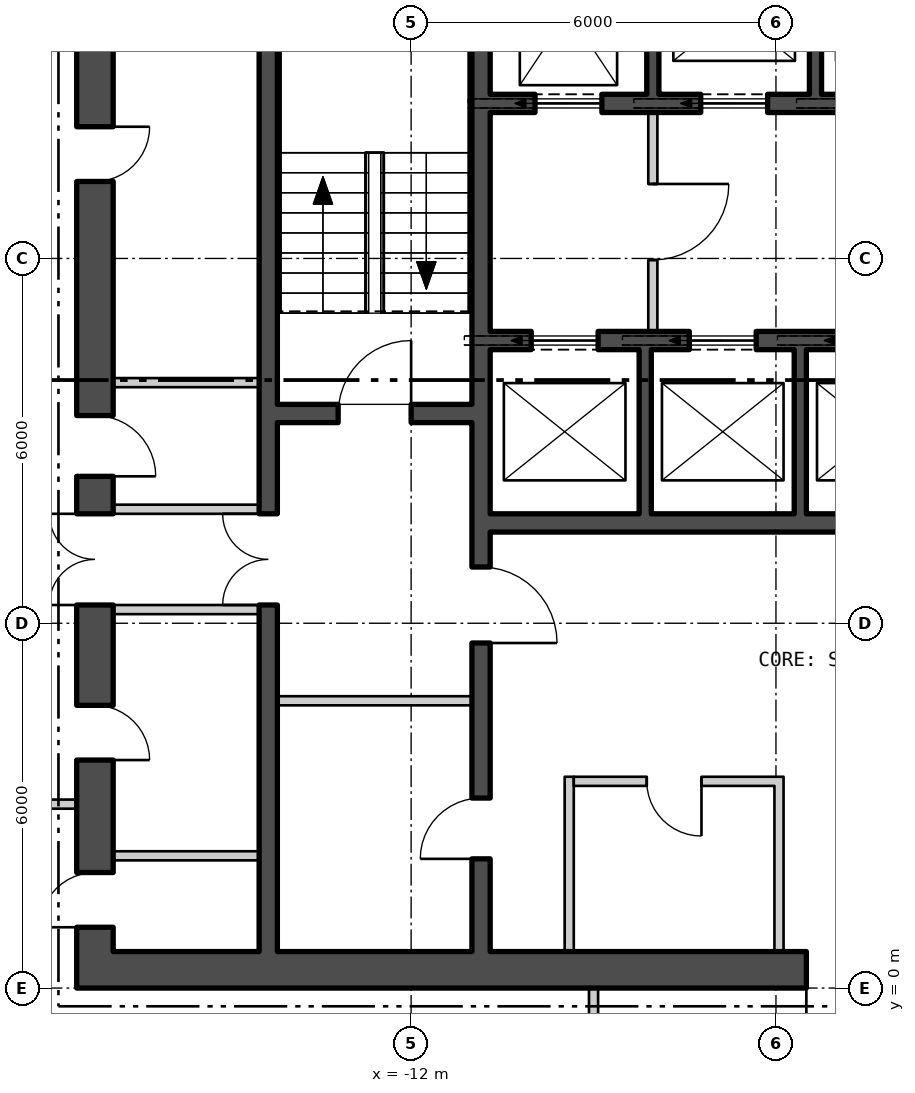
"""IFC4 building model, lengths in metres.
Left out: names, types, materials, properties, quantities, classifications, styles, units other than length and angle.
Written with IfcOpenShell. Run it as: python <this file> out.ifc"""

import sys

from ifc_helpers import new_model, si_unit, direction, frame, frame_2d, origin, place, context, subcontext, project, spatial, rectangle, extrude, element, fill, save


model = new_model("IFC4")
c1 = context("Model", 3, precision=1e-05, world=origin(), true_north=direction((0.0, 1.0)))
c2 = subcontext(c1, "Body", "Model", "MODEL_VIEW")
j1 = project(units=[si_unit("LENGTHUNIT", "METRE"), si_unit("PLANEANGLEUNIT", "RADIAN")], contexts=[c1])
p1 = place(None, origin())
s1 = spatial("IfcSite", under=j1, at=p1, CompositionType="ELEMENT")
p2 = place(p1, origin())
s2 = spatial("IfcBuilding", under=s1, at=p2, CompositionType="ELEMENT")
p3 = place(p2, frame((0.0, 0.0, 23.7)))
s3 = spatial("IfcBuildingStorey", under=s2, at=p3, CompositionType="ELEMENT", Elevation=23.7)
p4 = place(p3, frame((-17.5, 0.3, 0.0), z_axis=(0.0, 0.0, 1.0), x_axis=(1.0, 0.0, 0.0)))
e1 = element("IfcWall", 1, at=p4, inside=s3, PredefinedType="SHEAR", context=c2, shape_type="SweptSolid", body=[
    extrude(rectangle(XDim=35.0, YDim=0.6, at=frame_2d((17.5, 0.0))), origin(), (0.0, 0.0, 1.0), 4.85),
])
p5 = place(p4, frame((12.0, 0.0, 0.0)))
e2 = element("IfcOpeningElement", 2, at=p5, cuts=e1, PredefinedType="OPENING", context=c2, shape_type="SweptSolid", body=[
    extrude(rectangle(XDim=1.8, YDim=2.4, at=frame_2d((0.9, 1.2))), frame((0.0, 0.31, 0.0), z_axis=(0.0, -1.0, 0.0), x_axis=(1.0, 0.0, 0.0)), (0.0, 0.0, 1.0), 0.62),
])
p6 = place(p4, frame((22.0, 0.0, 0.0)))
e3 = element("IfcOpeningElement", 3, at=p6, cuts=e1, PredefinedType="OPENING", context=c2, shape_type="SweptSolid", body=[
    extrude(rectangle(XDim=1.8, YDim=2.4, at=frame_2d((0.9, 1.2))), frame((0.0, 0.31, 0.0), z_axis=(0.0, -1.0, 0.0), x_axis=(1.0, 0.0, 0.0)), (0.0, 0.0, 1.0), 0.62),
])
p7 = place(p3, frame((-17.2, 0.6, 0.0), z_axis=(0.0, 0.0, 1.0), x_axis=(0.0, 1.0, 0.0)))
e4 = element("IfcWall", 4, at=p7, inside=s3, PredefinedType="SHEAR", context=c2, shape_type="SweptSolid", body=[
    extrude(rectangle(XDim=16.8, YDim=0.6, at=frame_2d((8.4, 0.0))), origin(), (0.0, 0.0, 1.0), 4.85),
])
p8 = place(p7, frame((5.7, 0.0, 0.0)))
e5 = element("IfcOpeningElement", 5, at=p8, cuts=e4, PredefinedType="OPENING", context=c2, shape_type="SweptSolid", body=[
    extrude(rectangle(XDim=1.5, YDim=2.1, at=frame_2d((0.75, 1.05))), frame((0.0, 0.31, 0.0), z_axis=(0.0, -1.0, 0.0), x_axis=(1.0, 0.0, 0.0)), (0.0, 0.0, 1.0), 0.62),
])
p9 = place(p7, frame((0.4, 0.0, 0.0)))
e6 = element("IfcOpeningElement", 6, at=p9, cuts=e4, PredefinedType="OPENING", context=c2, shape_type="SweptSolid", body=[
    extrude(rectangle(XDim=0.9, YDim=2.1, at=frame_2d((0.45, 1.05))), frame((0.0, 0.31, 0.0), z_axis=(0.0, -1.0, 0.0), x_axis=(1.0, 0.0, 0.0)), (0.0, 0.0, 1.0), 0.62),
])
p10 = place(p7, frame((3.15, 0.0, 0.0)))
e7 = element("IfcOpeningElement", 7, at=p10, cuts=e4, PredefinedType="OPENING", context=c2, shape_type="SweptSolid", body=[
    extrude(rectangle(XDim=0.9, YDim=2.1, at=frame_2d((0.45, 1.05))), frame((0.0, 0.31, 0.0), z_axis=(0.0, -1.0, 0.0), x_axis=(1.0, 0.0, 0.0)), (0.0, 0.0, 1.0), 0.62),
])
p11 = place(p7, frame((7.816, 0.0, 0.0)))
e8 = element("IfcOpeningElement", 8, at=p11, cuts=e4, PredefinedType="OPENING", context=c2, shape_type="SweptSolid", body=[
    extrude(rectangle(XDim=1.0, YDim=2.1, at=frame_2d((0.5, 1.05))), frame((0.0, 0.31, 0.0), z_axis=(0.0, -1.0, 0.0), x_axis=(1.0, 0.0, 0.0)), (0.0, 0.0, 1.0), 0.62),
])
p12 = place(p7, frame((12.666, 0.0, 0.0)))
e9 = element("IfcOpeningElement", 9, at=p12, cuts=e4, PredefinedType="OPENING", context=c2, shape_type="SweptSolid", body=[
    extrude(rectangle(XDim=0.9, YDim=2.1, at=frame_2d((0.45, 1.05))), frame((0.0, 0.31, 0.0), z_axis=(0.0, -1.0, 0.0), x_axis=(1.0, 0.0, 0.0)), (0.0, 0.0, 1.0), 0.62),
])
p13 = place(p3, frame((-10.85, 0.6, 0.0), z_axis=(0.0, 0.0, 1.0), x_axis=(0.0, 1.0, 0.0)))
e10 = element("IfcWall", 10, at=p13, inside=s3, PredefinedType="SHEAR", context=c2, shape_type="SweptSolid", body=[
    extrude(rectangle(XDim=16.8, YDim=0.3, at=frame_2d((8.4, 0.0))), origin(), (0.0, 0.0, 1.0), 4.85),
])
p14 = place(p13, frame((5.075, 0.0, 0.0)))
e11 = element("IfcOpeningElement", 11, at=p14, cuts=e10, PredefinedType="OPENING", context=c2, shape_type="SweptSolid", body=[
    extrude(rectangle(XDim=1.25, YDim=2.1, at=frame_2d((0.625, 1.05))), frame((0.0, 0.16, 0.0), z_axis=(0.0, -1.0, 0.0), x_axis=(1.0, 0.0, 0.0)), (0.0, 0.0, 1.0), 0.32),
])
p15 = place(p13, frame((1.525, 0.0, 0.0)))
e12 = element("IfcOpeningElement", 12, at=p15, cuts=e10, PredefinedType="OPENING", context=c2, shape_type="SweptSolid", body=[
    extrude(rectangle(XDim=1.0, YDim=2.1, at=frame_2d((0.5, 1.05))), frame((0.0, 0.16, 0.0), z_axis=(0.0, -1.0, 0.0), x_axis=(1.0, 0.0, 0.0)), (0.0, 0.0, 1.0), 0.32),
])
p16 = place(p3, frame((-14.35, 0.6, 0.0), z_axis=(0.0, 0.0, 1.0), x_axis=(0.0, 1.0, 0.0)))
e13 = element("IfcWall", 13, at=p16, inside=s3, PredefinedType="SHEAR", context=c2, shape_type="SweptSolid", body=[
    extrude(rectangle(XDim=16.8, YDim=0.3, at=frame_2d((8.4, 0.0))), origin(), (0.0, 0.0, 1.0), 4.85),
])
p17 = place(p16, frame((5.7, 0.0, 0.0)))
e14 = element("IfcOpeningElement", 14, at=p17, cuts=e13, PredefinedType="OPENING", context=c2, shape_type="SweptSolid", body=[
    extrude(rectangle(XDim=1.5, YDim=2.1, at=frame_2d((0.75, 1.05))), frame((0.0, 0.16, 0.0), z_axis=(0.0, -1.0, 0.0), x_axis=(1.0, 0.0, 0.0)), (0.0, 0.0, 1.0), 0.32),
])
p18 = place(p3, frame((-14.2, 9.45, 0.0), z_axis=(0.0, 0.0, 1.0), x_axis=(1.0, 0.0, 0.0)))
e15 = element("IfcWall", 15, at=p18, inside=s3, PredefinedType="SHEAR", context=c2, shape_type="SweptSolid", body=[
    extrude(rectangle(XDim=3.2, YDim=0.3, at=frame_2d((1.6, 0.0))), origin(), (0.0, 0.0, 1.0), 4.85),
])
p19 = place(p18, frame((1.0, 0.0, 0.0)))
e16 = element("IfcOpeningElement", 16, at=p19, cuts=e15, PredefinedType="OPENING", context=c2, shape_type="SweptSolid", body=[
    extrude(rectangle(XDim=1.2, YDim=2.1, at=frame_2d((0.6, 1.05))), frame((0.0, 0.16, 0.0), z_axis=(0.0, -1.0, 0.0), x_axis=(1.0, 0.0, 0.0)), (0.0, 0.0, 1.0), 0.32),
])
p20 = place(p3, frame((-10.7, 14.55, 0.0), z_axis=(0.0, 0.0, 1.0), x_axis=(1.0, 0.0, 0.0)))
e17 = element("IfcWall", 17, at=p20, inside=s3, PredefinedType="SHEAR", context=c2, shape_type="SweptSolid", body=[
    extrude(rectangle(XDim=21.4, YDim=0.3, at=frame_2d((10.7, 0.0))), origin(), (0.0, 0.0, 1.0), 4.85),
])
p21 = place(p20, frame((0.738, 0.0, 0.0)))
e18 = element("IfcOpeningElement", 18, at=p21, cuts=e17, PredefinedType="OPENING", context=c2, shape_type="SweptSolid", body=[
    extrude(rectangle(XDim=1.1, YDim=2.1, at=frame_2d((0.55, 1.05))), frame((0.0, 0.16, 0.0), z_axis=(0.0, -1.0, 0.0), x_axis=(1.0, 0.0, 0.0)), (0.0, 0.0, 1.0), 0.32),
])
p22 = place(p20, frame((3.462, 0.0, 0.0)))
e19 = element("IfcOpeningElement", 19, at=p22, cuts=e17, PredefinedType="OPENING", context=c2, shape_type="SweptSolid", body=[
    extrude(rectangle(XDim=1.1, YDim=2.1, at=frame_2d((0.55, 1.05))), frame((0.0, 0.16, 0.0), z_axis=(0.0, -1.0, 0.0), x_axis=(1.0, 0.0, 0.0)), (0.0, 0.0, 1.0), 0.32),
])
p23 = place(p20, frame((6.138, 0.0, 0.0)))
e20 = element("IfcOpeningElement", 20, at=p23, cuts=e17, PredefinedType="OPENING", context=c2, shape_type="SweptSolid", body=[
    extrude(rectangle(XDim=1.1, YDim=2.1, at=frame_2d((0.55, 1.05))), frame((0.0, 0.16, 0.0), z_axis=(0.0, -1.0, 0.0), x_axis=(1.0, 0.0, 0.0)), (0.0, 0.0, 1.0), 0.32),
])
p24 = place(p20, frame((8.812, 0.0, 0.0)))
e21 = element("IfcOpeningElement", 21, at=p24, cuts=e17, PredefinedType="OPENING", context=c2, shape_type="SweptSolid", body=[
    extrude(rectangle(XDim=1.1, YDim=2.1, at=frame_2d((0.55, 1.05))), frame((0.0, 0.16, 0.0), z_axis=(0.0, -1.0, 0.0), x_axis=(1.0, 0.0, 0.0)), (0.0, 0.0, 1.0), 0.32),
])
p25 = place(p20, frame((14.162, 0.0, 0.0)))
e22 = element("IfcOpeningElement", 22, at=p25, cuts=e17, PredefinedType="OPENING", context=c2, shape_type="SweptSolid", body=[
    extrude(rectangle(XDim=1.1, YDim=2.1, at=frame_2d((0.55, 1.05))), frame((0.0, 0.16, 0.0), z_axis=(0.0, -1.0, 0.0), x_axis=(1.0, 0.0, 0.0)), (0.0, 0.0, 1.0), 0.32),
])
p26 = place(p20, frame((16.837, 0.0, 0.0)))
e23 = element("IfcOpeningElement", 23, at=p26, cuts=e17, PredefinedType="OPENING", context=c2, shape_type="SweptSolid", body=[
    extrude(rectangle(XDim=1.1, YDim=2.1, at=frame_2d((0.55, 1.05))), frame((0.0, 0.16, 0.0), z_axis=(0.0, -1.0, 0.0), x_axis=(1.0, 0.0, 0.0)), (0.0, 0.0, 1.0), 0.32),
])
p27 = place(p20, frame((19.562, 0.0, 0.0)))
e24 = element("IfcOpeningElement", 24, at=p27, cuts=e17, PredefinedType="OPENING", context=c2, shape_type="SweptSolid", body=[
    extrude(rectangle(XDim=1.1, YDim=2.1, at=frame_2d((0.55, 1.05))), frame((0.0, 0.16, 0.0), z_axis=(0.0, -1.0, 0.0), x_axis=(1.0, 0.0, 0.0)), (0.0, 0.0, 1.0), 0.32),
])
p28 = place(p3, frame((-10.7, 10.65, 0.0), z_axis=(0.0, 0.0, 1.0), x_axis=(1.0, 0.0, 0.0)))
e25 = element("IfcWall", 25, at=p28, inside=s3, PredefinedType="SHEAR", context=c2, shape_type="SweptSolid", body=[
    extrude(rectangle(XDim=10.3, YDim=0.3, at=frame_2d((5.15, 0.0))), origin(), (0.0, 0.0, 1.0), 4.85),
])
p29 = place(p28, frame((0.675, 0.0, 0.0)))
e26 = element("IfcOpeningElement", 26, at=p29, cuts=e25, PredefinedType="OPENING", context=c2, shape_type="SweptSolid", body=[
    extrude(rectangle(XDim=1.1, YDim=2.1, at=frame_2d((0.55, 1.05))), frame((0.0, 0.16, 0.0), z_axis=(0.0, -1.0, 0.0), x_axis=(1.0, 0.0, 0.0)), (0.0, 0.0, 1.0), 0.32),
])
p30 = place(p28, frame((3.275, 0.0, 0.0)))
e27 = element("IfcOpeningElement", 27, at=p30, cuts=e25, PredefinedType="OPENING", context=c2, shape_type="SweptSolid", body=[
    extrude(rectangle(XDim=1.1, YDim=2.1, at=frame_2d((0.55, 1.05))), frame((0.0, 0.16, 0.0), z_axis=(0.0, -1.0, 0.0), x_axis=(1.0, 0.0, 0.0)), (0.0, 0.0, 1.0), 0.32),
])
p31 = place(p28, frame((5.825, 0.0, 0.0)))
e28 = element("IfcOpeningElement", 28, at=p31, cuts=e25, PredefinedType="OPENING", context=c2, shape_type="SweptSolid", body=[
    extrude(rectangle(XDim=1.1, YDim=2.1, at=frame_2d((0.55, 1.05))), frame((0.0, 0.16, 0.0), z_axis=(0.0, -1.0, 0.0), x_axis=(1.0, 0.0, 0.0)), (0.0, 0.0, 1.0), 0.32),
])
p32 = place(p28, frame((8.375, 0.0, 0.0)))
e29 = element("IfcOpeningElement", 29, at=p32, cuts=e25, PredefinedType="OPENING", context=c2, shape_type="SweptSolid", body=[
    extrude(rectangle(XDim=1.1, YDim=2.1, at=frame_2d((0.55, 1.05))), frame((0.0, 0.16, 0.0), z_axis=(0.0, -1.0, 0.0), x_axis=(1.0, 0.0, 0.0)), (0.0, 0.0, 1.0), 0.32),
])
p33 = place(p3, frame((-10.7, 7.65, 0.0), z_axis=(0.0, 0.0, 1.0), x_axis=(1.0, 0.0, 0.0)))
e30 = element("IfcWall", 30, at=p33, inside=s3, PredefinedType="SHEAR", context=c2, shape_type="SweptSolid", body=[
    extrude(rectangle(XDim=10.3, YDim=0.3, at=frame_2d((5.15, 0.0))), origin(), (0.0, 0.0, 1.0), 4.85),
])
for number, where, z_axis, x_axis in (
    (31, (-8.025, 14.7, 0.0), (0.0, 0.0, 1.0), (0.0, 1.0, 0.0)),
    (32, (-5.35, 14.7, 0.0), (0.0, 0.0, 1.0), (0.0, 1.0, 0.0)),
    (33, (-8.15, 7.8, 0.0), (0.0, 0.0, 1.0), (0.0, 1.0, 0.0)),
    (34, (-5.6, 7.8, 0.0), (0.0, 0.0, 1.0), (0.0, 1.0, 0.0)),
):
    element("IfcWall", number, at=place(p3, frame(where, z_axis=z_axis, x_axis=x_axis)), inside=s3, PredefinedType="SHEAR", context=c2, shape_type="SweptSolid", body=[
        extrude(rectangle(XDim=2.7, YDim=0.2, at=frame_2d((1.35, 0.0))), origin(), (0.0, 0.0, 1.0), 4.85),
    ])
p34 = place(p3, frame((-8.025, 10.8, 0.0), z_axis=(0.0, 0.0, 1.0), x_axis=(0.0, 1.0, 0.0)))
e35 = element("IfcWall", 35, at=p34, inside=s3, PredefinedType="PARTITIONING", context=c2, shape_type="SweptSolid", body=[
    extrude(rectangle(XDim=3.6, YDim=0.15, at=frame_2d((1.8, 0.0))), origin(), (0.0, 0.0, 1.0), 4.85),
])
p35 = place(p34, frame((1.175, 0.0, 0.0)))
e36 = element("IfcOpeningElement", 36, at=p35, cuts=e35, PredefinedType="OPENING", context=c2, shape_type="SweptSolid", body=[
    extrude(rectangle(XDim=1.25, YDim=2.1, at=frame_2d((0.625, 1.05))), frame((0.0, 0.085, 0.0), z_axis=(0.0, -1.0, 0.0), x_axis=(1.0, 0.0, 0.0)), (0.0, 0.0, 1.0), 0.17),
])
p36 = place(p3, frame((-14.2, 4.725, 0.0), z_axis=(0.0, 0.0, 1.0), x_axis=(1.0, 0.0, 0.0)))
e37 = element("IfcWall", 37, at=p36, inside=s3, PredefinedType="PARTITIONING", context=c2, shape_type="SweptSolid", body=[
    extrude(rectangle(XDim=3.2, YDim=0.15, at=frame_2d((1.6, 0.0))), origin(), (0.0, 0.0, 1.0), 4.85),
])
for number, where, z_axis, x_axis in (
    (38, (-16.9, 6.225, 0.0), (0.0, 0.0, 1.0), (1.0, 0.0, 0.0)),
    (39, (-16.9, 7.875, 0.0), (0.0, 0.0, 1.0), (1.0, 0.0, 0.0)),
    (40, (-16.9, 2.175, 0.0), (0.0, 0.0, 1.0), (1.0, 0.0, 0.0)),
    (41, (-16.9, 9.957, 0.0), (0.0, 0.0, 1.0), (1.0, 0.0, 0.0)),
):
    element("IfcWall", number, at=place(p3, frame(where, z_axis=z_axis, x_axis=x_axis)), inside=s3, PredefinedType="PARTITIONING", context=c2, shape_type="SweptSolid", body=[
        extrude(rectangle(XDim=2.4, YDim=0.15, at=frame_2d((1.2, 0.0))), origin(), (0.0, 0.0, 1.0), 4.85),
    ])
for number, where, z_axis, x_axis in (
    (42, (-9.4, 0.6, 0.0), (0.0, 0.0, 1.0), (0.0, 1.0, 0.0)),
    (43, (-5.95, 0.6, 0.0), (0.0, 0.0, 1.0), (0.0, 1.0, 0.0)),
):
    element("IfcWall", number, at=place(p3, frame(where, z_axis=z_axis, x_axis=x_axis)), inside=s3, PredefinedType="PARTITIONING", context=c2, shape_type="SweptSolid", body=[
        extrude(rectangle(XDim=2.875, YDim=0.15, at=frame_2d((1.438, 0.0))), origin(), (0.0, 0.0, 1.0), 4.85),
    ])
p37 = place(p3, frame((-9.325, 3.4, 0.0), z_axis=(0.0, 0.0, 1.0), x_axis=(1.0, 0.0, 0.0)))
e44 = element("IfcWall", 44, at=p37, inside=s3, PredefinedType="PARTITIONING", context=c2, shape_type="SweptSolid", body=[
    extrude(rectangle(XDim=3.3, YDim=0.15, at=frame_2d((1.65, 0.0))), origin(), (0.0, 0.0, 1.0), 4.85),
])
p38 = place(p37, frame((1.2, 0.0, 0.0)))
e45 = element("IfcOpeningElement", 45, at=p38, cuts=e44, PredefinedType="OPENING", context=c2, shape_type="SweptSolid", body=[
    extrude(rectangle(XDim=0.9, YDim=2.1, at=frame_2d((0.45, 1.05))), frame((0.0, 0.085, 0.0), z_axis=(0.0, -1.0, 0.0), x_axis=(1.0, 0.0, 0.0)), (0.0, 0.0, 1.0), 0.17),
])
p39 = place(p3, frame((-19.825, 3.025, 0.0), z_axis=(0.0, 0.0, 1.0), x_axis=(1.0, 0.0, 0.0)))
e46 = element("IfcWall", 46, at=p39, inside=s3, PredefinedType="PARTITIONING", context=c2, shape_type="SweptSolid", body=[
    extrude(rectangle(XDim=2.325, YDim=0.15, at=frame_2d((1.163, 0.0))), origin(), (0.0, 0.0, 1.0), 4.3),
])
p40 = place(p39, frame((0.662, 0.0, 0.0)))
e47 = element("IfcOpeningElement", 47, at=p40, cuts=e46, PredefinedType="OPENING", context=c2, shape_type="SweptSolid", body=[
    extrude(rectangle(XDim=1.0, YDim=2.1, at=frame_2d((0.5, 1.05))), frame((0.0, 0.085, 0.0), z_axis=(0.0, -1.0, 0.0), x_axis=(1.0, 0.0, 0.0)), (0.0, 0.0, 1.0), 0.17),
])
p41 = place(p3, frame((-9.0, -13.675, 0.0), z_axis=(0.0, 0.0, 1.0), x_axis=(0.0, 1.0, 0.0)))
e48 = element("IfcWall", 48, at=p41, inside=s3, PredefinedType="PARTITIONING", context=c2, shape_type="SweptSolid", body=[
    extrude(rectangle(XDim=13.675, YDim=0.15, at=frame_2d((6.838, 0.0))), origin(), (0.0, 0.0, 1.0), 4.85),
])
p42 = place(p41, frame((11.975, 0.0, 0.0)))
e49 = element("IfcOpeningElement", 49, at=p42, cuts=e48, PredefinedType="OPENING", context=c2, shape_type="SweptSolid", body=[
    extrude(rectangle(XDim=1.0, YDim=2.1, at=frame_2d((0.5, 1.05))), frame((0.0, 0.085, 0.0), z_axis=(0.0, -1.0, 0.0), x_axis=(1.0, 0.0, 0.0)), (0.0, 0.0, 1.0), 0.17),
])
p43 = place(p21, origin())
e50 = element("IfcDoor", 50, at=p43, inside=s3, OperationType="SLIDING_TO_LEFT", PredefinedType="DOOR", context=c2, shape_type="SweptSolid", body=[
    extrude(rectangle(XDim=1.1, YDim=2.1, at=frame_2d((0.55, 1.05))), frame((0.0, 0.025, 0.0), z_axis=(0.0, -1.0, 0.0), x_axis=(1.0, 0.0, 0.0)), (0.0, 0.0, 1.0), 0.05),
])
fill(e18, e50)
p44 = place(p22, origin())
e51 = element("IfcDoor", 51, at=p44, inside=s3, OperationType="SLIDING_TO_LEFT", PredefinedType="DOOR", context=c2, shape_type="SweptSolid", body=[
    extrude(rectangle(XDim=1.1, YDim=2.1, at=frame_2d((0.55, 1.05))), frame((0.0, 0.025, 0.0), z_axis=(0.0, -1.0, 0.0), x_axis=(1.0, 0.0, 0.0)), (0.0, 0.0, 1.0), 0.05),
])
fill(e19, e51)
p45 = place(p29, origin())
e52 = element("IfcDoor", 52, at=p45, inside=s3, OperationType="SLIDING_TO_LEFT", PredefinedType="DOOR", context=c2, shape_type="SweptSolid", body=[
    extrude(rectangle(XDim=1.1, YDim=2.1, at=frame_2d((0.55, 1.05))), frame((0.0, 0.025, 0.0), z_axis=(0.0, -1.0, 0.0), x_axis=(1.0, 0.0, 0.0)), (0.0, 0.0, 1.0), 0.05),
])
fill(e26, e52)
p46 = place(p30, origin())
e53 = element("IfcDoor", 53, at=p46, inside=s3, OperationType="SLIDING_TO_LEFT", PredefinedType="DOOR", context=c2, shape_type="SweptSolid", body=[
    extrude(rectangle(XDim=1.1, YDim=2.1, at=frame_2d((0.55, 1.05))), frame((0.0, 0.025, 0.0), z_axis=(0.0, -1.0, 0.0), x_axis=(1.0, 0.0, 0.0)), (0.0, 0.0, 1.0), 0.05),
])
fill(e27, e53)
p47 = place(p35, origin())
e54 = element("IfcDoor", 54, at=p47, inside=s3, OperationType="SINGLE_SWING_RIGHT", PredefinedType="DOOR", context=c2, shape_type="SweptSolid", body=[
    extrude(rectangle(XDim=1.25, YDim=2.1, at=frame_2d((0.625, 1.05))), frame((0.0, 0.025, 0.0), z_axis=(0.0, -1.0, 0.0), x_axis=(1.0, 0.0, 0.0)), (0.0, 0.0, 1.0), 0.05),
])
fill(e36, e54)
p48 = place(p19, origin())
e55 = element("IfcDoor", 55, at=p48, inside=s3, OperationType="SINGLE_SWING_LEFT", PredefinedType="DOOR", context=c2, shape_type="SweptSolid", body=[
    extrude(rectangle(XDim=1.2, YDim=2.1, at=frame_2d((0.6, 1.05))), frame((0.0, 0.025, 0.0), z_axis=(0.0, -1.0, 0.0), x_axis=(1.0, 0.0, 0.0)), (0.0, 0.0, 1.0), 0.05),
])
fill(e16, e55)
p49 = place(p14, origin())
e56 = element("IfcDoor", 56, at=p49, inside=s3, OperationType="SINGLE_SWING_LEFT", PredefinedType="DOOR", context=c2, shape_type="SweptSolid", body=[
    extrude(rectangle(XDim=1.25, YDim=2.1, at=frame_2d((0.625, 1.05))), frame((0.0, 0.025, 0.0), z_axis=(0.0, -1.0, 0.0), x_axis=(1.0, 0.0, 0.0)), (0.0, 0.0, 1.0), 0.05),
])
fill(e11, e56)
p50 = place(p15, origin())
e57 = element("IfcDoor", 57, at=p50, inside=s3, OperationType="SINGLE_SWING_RIGHT", PredefinedType="DOOR", context=c2, shape_type="SweptSolid", body=[
    extrude(rectangle(XDim=1.0, YDim=2.1, at=frame_2d((0.5, 1.05))), frame((0.0, 0.025, 0.0), z_axis=(0.0, -1.0, 0.0), x_axis=(1.0, 0.0, 0.0)), (0.0, 0.0, 1.0), 0.05),
])
fill(e12, e57)
p51 = place(p17, origin())
e58 = element("IfcDoor", 58, at=p51, inside=s3, OperationType="DOUBLE_DOOR_SINGLE_SWING", PredefinedType="DOOR", context=c2, shape_type="SweptSolid", body=[
    extrude(rectangle(XDim=1.5, YDim=2.1, at=frame_2d((0.75, 1.05))), frame((0.0, 0.025, 0.0), z_axis=(0.0, -1.0, 0.0), x_axis=(1.0, 0.0, 0.0)), (0.0, 0.0, 1.0), 0.05),
])
fill(e14, e58)
p52 = place(p8, origin())
e59 = element("IfcDoor", 59, at=p52, inside=s3, OperationType="DOUBLE_DOOR_SINGLE_SWING", PredefinedType="DOOR", context=c2, shape_type="SweptSolid", body=[
    extrude(rectangle(XDim=1.5, YDim=2.1, at=frame_2d((0.75, 1.05))), frame((0.0, 0.025, 0.0), z_axis=(0.0, -1.0, 0.0), x_axis=(1.0, 0.0, 0.0)), (0.0, 0.0, 1.0), 0.05),
])
fill(e5, e59)
p53 = place(p9, origin())
e60 = element("IfcDoor", 60, at=p53, inside=s3, OperationType="SINGLE_SWING_RIGHT", PredefinedType="DOOR", context=c2, shape_type="SweptSolid", body=[
    extrude(rectangle(XDim=0.9, YDim=2.1, at=frame_2d((0.45, 1.05))), frame((0.0, 0.025, 0.0), z_axis=(0.0, -1.0, 0.0), x_axis=(1.0, 0.0, 0.0)), (0.0, 0.0, 1.0), 0.05),
])
fill(e6, e60)
p54 = place(p10, origin())
e61 = element("IfcDoor", 61, at=p54, inside=s3, OperationType="SINGLE_SWING_LEFT", PredefinedType="DOOR", context=c2, shape_type="SweptSolid", body=[
    extrude(rectangle(XDim=0.9, YDim=2.1, at=frame_2d((0.45, 1.05))), frame((0.0, 0.025, 0.0), z_axis=(0.0, -1.0, 0.0), x_axis=(1.0, 0.0, 0.0)), (0.0, 0.0, 1.0), 0.05),
])
fill(e7, e61)
p55 = place(p11, origin())
e62 = element("IfcDoor", 62, at=p55, inside=s3, OperationType="SINGLE_SWING_LEFT", PredefinedType="DOOR", context=c2, shape_type="SweptSolid", body=[
    extrude(rectangle(XDim=1.0, YDim=2.1, at=frame_2d((0.5, 1.05))), frame((0.0, 0.025, 0.0), z_axis=(0.0, -1.0, 0.0), x_axis=(1.0, 0.0, 0.0)), (0.0, 0.0, 1.0), 0.05),
])
fill(e8, e62)
p56 = place(p12, origin())
e63 = element("IfcDoor", 63, at=p56, inside=s3, OperationType="SINGLE_SWING_RIGHT", PredefinedType="DOOR", context=c2, shape_type="SweptSolid", body=[
    extrude(rectangle(XDim=0.9, YDim=2.1, at=frame_2d((0.45, 1.05))), frame((0.0, 0.025, 0.0), z_axis=(0.0, -1.0, 0.0), x_axis=(1.0, 0.0, 0.0)), (0.0, 0.0, 1.0), 0.05),
])
fill(e9, e63)
p57 = place(p38, origin())
e64 = element("IfcDoor", 64, at=p57, inside=s3, OperationType="SINGLE_SWING_RIGHT", PredefinedType="DOOR", context=c2, shape_type="SweptSolid", body=[
    extrude(rectangle(XDim=0.9, YDim=2.1, at=frame_2d((0.45, 1.05))), frame((0.0, 0.025, 0.0), z_axis=(0.0, -1.0, 0.0), x_axis=(1.0, 0.0, 0.0)), (0.0, 0.0, 1.0), 0.05),
])
fill(e45, e64)
p58 = place(p5, origin())
e65 = element("IfcDoor", 65, at=p58, inside=s3, OperationType="DOUBLE_DOOR_SINGLE_SWING", PredefinedType="DOOR", context=c2, shape_type="SweptSolid", body=[
    extrude(rectangle(XDim=1.8, YDim=2.4, at=frame_2d((0.9, 1.2))), frame((0.0, 0.025, 0.0), z_axis=(0.0, -1.0, 0.0), x_axis=(1.0, 0.0, 0.0)), (0.0, 0.0, 1.0), 0.05),
])
fill(e2, e65)
save(model, sys.argv[1])
